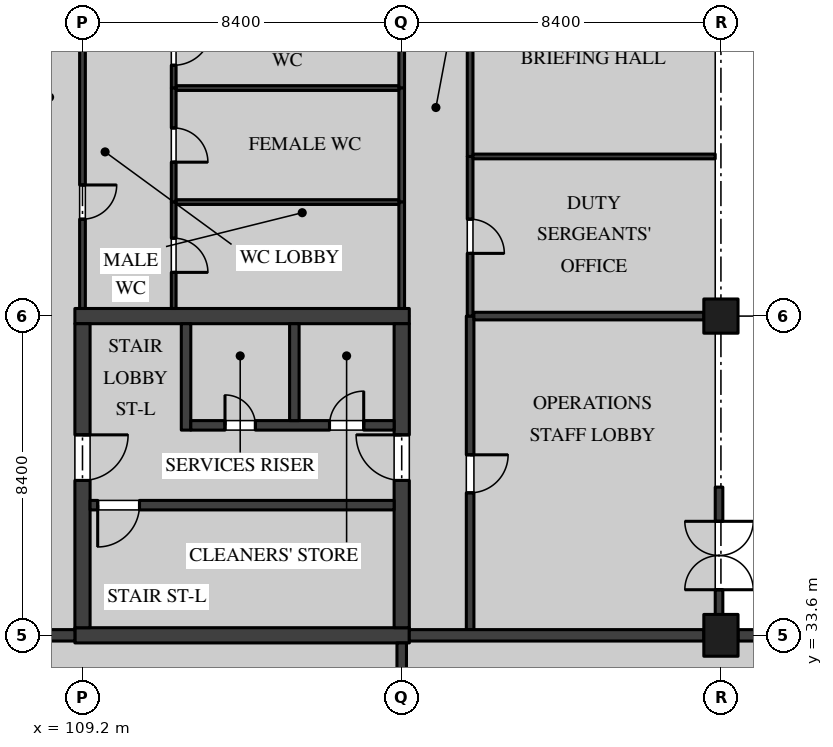
"""IFC4 building model, lengths in metres.
Left out: names, types, materials, properties, quantities, classifications, styles, units other than length and angle.
Written with IfcOpenShell. Run it as: python <this file> out.ifc"""

import sys

from ifc_helpers import new_model, si_unit, direction, frame, frame_2d, origin, origin_2d, place, context, subcontext, project, spatial, rectangle, extrude, element, fill, save


model = new_model("IFC4")
c1 = context("Model", 3, precision=1e-05, world=origin(), true_north=direction((0.0, 1.0)))
c2 = subcontext(c1, "Body", "Model", "MODEL_VIEW")
j1 = project(units=[si_unit("LENGTHUNIT", "METRE"), si_unit("PLANEANGLEUNIT", "RADIAN")], contexts=[c1])
p1 = place(None, origin())
s1 = spatial("IfcSite", under=j1, at=p1, CompositionType="ELEMENT")
p2 = place(p1, origin())
s2 = spatial("IfcBuilding", under=s1, at=p2, CompositionType="ELEMENT")
p3 = place(p2, origin())
s3 = spatial("IfcBuildingStorey", under=s2, at=p3, CompositionType="ELEMENT", Elevation=0.0)
p4 = place(p3, frame((126.0, 33.6, 0.0), z_axis=(0.0, 0.0, 1.0), x_axis=(1.0, 0.0, 0.0)))
e1 = element("IfcColumn", 1, at=p4, inside=s3, PredefinedType="COLUMN", context=c2, shape_type="SweptSolid", body=[
    extrude(rectangle(XDim=0.9, YDim=1.1, at=origin_2d()), origin(), (0.0, 0.0, 1.0), 5.05),
])
p5 = place(p3, frame((126.0, 42.0, 0.0), z_axis=(0.0, 0.0, 1.0), x_axis=(1.0, 0.0, 0.0)))
e2 = element("IfcColumn", 2, at=p5, inside=s3, PredefinedType="COLUMN", context=c2, shape_type="SweptSolid", body=[
    extrude(rectangle(XDim=0.9, YDim=0.9, at=origin_2d()), origin(), (0.0, 0.0, 1.0), 5.05),
])
for number, where, z_axis, x_axis in (
    (3, (109.0, 33.6, 0.0), (0.0, 0.0, 1.0), (1.0, 0.0, 0.0)),
    (4, (109.0, 42.0, 0.0), (0.0, 0.0, 1.0), (1.0, 0.0, 0.0)),
):
    element("IfcWall", number, at=place(p3, frame(where, z_axis=z_axis, x_axis=x_axis)), inside=s3, PredefinedType="SHEAR", context=c2, shape_type="SweptSolid", body=[
        extrude(rectangle(XDim=8.8, YDim=0.4, at=frame_2d((4.4, 0.0))), origin(), (0.0, 0.0, 1.0), 5.05),
    ])
p6 = place(p3, frame((109.2, 33.8, 0.0), z_axis=(0.0, 0.0, 1.0), x_axis=(0.0, 1.0, 0.0)))
e5 = element("IfcWall", 5, at=p6, inside=s3, PredefinedType="SHEAR", context=c2, shape_type="SweptSolid", body=[
    extrude(rectangle(XDim=8.0, YDim=0.4, at=frame_2d((4.0, 0.0))), origin(), (0.0, 0.0, 1.0), 5.05),
])
p7 = place(p6, frame((3.875, 0.0, 0.0)))
e6 = element("IfcOpeningElement", 6, at=p7, cuts=e5, PredefinedType="OPENING", context=c2, shape_type="SweptSolid", body=[
    extrude(rectangle(XDim=1.2, YDim=2.1, at=frame_2d((0.6, 1.05))), frame((0.0, 0.21, 0.0), z_axis=(0.0, -1.0, 0.0), x_axis=(1.0, 0.0, 0.0)), (0.0, 0.0, 1.0), 0.42),
])
p8 = place(p3, frame((117.6, 33.8, 0.0), z_axis=(0.0, 0.0, 1.0), x_axis=(0.0, 1.0, 0.0)))
e7 = element("IfcWall", 7, at=p8, inside=s3, PredefinedType="SHEAR", context=c2, shape_type="SweptSolid", body=[
    extrude(rectangle(XDim=8.0, YDim=0.4, at=frame_2d((4.0, 0.0))), origin(), (0.0, 0.0, 1.0), 5.05),
])
p9 = place(p8, frame((3.875, 0.0, 0.0)))
e8 = element("IfcOpeningElement", 8, at=p9, cuts=e7, PredefinedType="OPENING", context=c2, shape_type="SweptSolid", body=[
    extrude(rectangle(XDim=1.2, YDim=2.1, at=frame_2d((0.6, 1.05))), frame((0.0, 0.21, 0.0), z_axis=(0.0, -1.0, 0.0), x_axis=(1.0, 0.0, 0.0)), (0.0, 0.0, 1.0), 0.42),
])
p10 = place(p3, frame((109.4, 37.025, 0.0), z_axis=(0.0, 0.0, 1.0), x_axis=(1.0, 0.0, 0.0)))
e9 = element("IfcWall", 9, at=p10, inside=s3, PredefinedType="SOLIDWALL", context=c2, shape_type="SweptSolid", body=[
    extrude(rectangle(XDim=8.0, YDim=0.25, at=frame_2d((4.0, 0.0))), origin(), (0.0, 0.0, 1.0), 5.05),
])
p11 = place(p10, frame((0.2, 0.0, 0.0)))
e10 = element("IfcOpeningElement", 10, at=p11, cuts=e9, PredefinedType="OPENING", context=c2, shape_type="SweptSolid", body=[
    extrude(rectangle(XDim=1.1, YDim=2.1, at=frame_2d((0.55, 1.05))), frame((0.0, 0.135, 0.0), z_axis=(0.0, -1.0, 0.0), x_axis=(1.0, 0.0, 0.0)), (0.0, 0.0, 1.0), 0.27),
])
p12 = place(p3, frame((111.925, 39.0, 0.0), z_axis=(0.0, 0.0, 1.0), x_axis=(0.0, 1.0, 0.0)))
e11 = element("IfcWall", 11, at=p12, inside=s3, PredefinedType="SOLIDWALL", context=c2, shape_type="SweptSolid", body=[
    extrude(rectangle(XDim=2.8, YDim=0.25, at=frame_2d((1.4, 0.0))), origin(), (0.0, 0.0, 1.0), 5.05),
])
p13 = place(p3, frame((112.05, 39.125, 0.0), z_axis=(0.0, 0.0, 1.0), x_axis=(1.0, 0.0, 0.0)))
e12 = element("IfcWall", 12, at=p13, inside=s3, PredefinedType="SOLIDWALL", context=c2, shape_type="SweptSolid", body=[
    extrude(rectangle(XDim=5.35, YDim=0.25, at=frame_2d((2.675, 0.0))), origin(), (0.0, 0.0, 1.0), 5.05),
])
p14 = place(p13, frame((3.65, 0.0, 0.0)))
e13 = element("IfcOpeningElement", 13, at=p14, cuts=e12, PredefinedType="OPENING", context=c2, shape_type="SweptSolid", body=[
    extrude(rectangle(XDim=0.9, YDim=2.1, at=frame_2d((0.45, 1.05))), frame((0.0, 0.135, 0.0), z_axis=(0.0, -1.0, 0.0), x_axis=(1.0, 0.0, 0.0)), (0.0, 0.0, 1.0), 0.27),
])
p15 = place(p13, frame((0.9, 0.0, 0.0)))
e14 = element("IfcOpeningElement", 14, at=p15, cuts=e12, PredefinedType="OPENING", context=c2, shape_type="SweptSolid", body=[
    extrude(rectangle(XDim=0.8, YDim=2.1, at=frame_2d((0.4, 1.05))), frame((0.0, 0.135, 0.0), z_axis=(0.0, -1.0, 0.0), x_axis=(1.0, 0.0, 0.0)), (0.0, 0.0, 1.0), 0.27),
])
p16 = place(p3, frame((114.775, 39.25, 0.0), z_axis=(0.0, 0.0, 1.0), x_axis=(0.0, 1.0, 0.0)))
e15 = element("IfcWall", 15, at=p16, inside=s3, PredefinedType="SOLIDWALL", context=c2, shape_type="SweptSolid", body=[
    extrude(rectangle(XDim=2.55, YDim=0.25, at=frame_2d((1.275, 0.0))), origin(), (0.0, 0.0, 1.0), 5.05),
])
p17 = place(p3, frame((117.6, 25.65, 0.0), z_axis=(0.0, 0.0, 1.0), x_axis=(0.0, 1.0, 0.0)))
e16 = element("IfcWall", 16, at=p17, inside=s3, PredefinedType="PARTITIONING", context=c2, shape_type="SweptSolid", body=[
    extrude(rectangle(XDim=7.75, YDim=0.25, at=frame_2d((3.875, 0.0))), origin(), (0.0, 0.0, 1.0), 8.375),
])
p18 = place(p3, frame((119.4, 33.75, 0.0), z_axis=(0.0, 0.0, 1.0), x_axis=(0.0, 1.0, 0.0)))
e17 = element("IfcWall", 17, at=p18, inside=s3, PredefinedType="PARTITIONING", context=c2, shape_type="SweptSolid", body=[
    extrude(rectangle(XDim=8.25, YDim=0.2, at=frame_2d((4.125, 0.0))), origin(), (0.0, 0.0, 1.0), 5.05),
])
p19 = place(p18, frame((3.6, 0.0, 0.0)))
e18 = element("IfcOpeningElement", 18, at=p19, cuts=e17, PredefinedType="OPENING", context=c2, shape_type="SweptSolid", body=[
    extrude(rectangle(XDim=1.0, YDim=2.4, at=frame_2d((0.5, 1.2))), frame((0.0, 0.11, 0.0), z_axis=(0.0, -1.0, 0.0), x_axis=(1.0, 0.0, 0.0)), (0.0, 0.0, 1.0), 0.22),
])
p20 = place(p3, frame((119.4, 42.0, 0.0), z_axis=(0.0, 0.0, 1.0), x_axis=(0.0, 1.0, 0.0)))
e19 = element("IfcWall", 19, at=p20, inside=s3, PredefinedType="PARTITIONING", context=c2, shape_type="SweptSolid", body=[
    extrude(rectangle(XDim=4.2, YDim=0.15, at=frame_2d((2.1, 0.0))), origin(), (0.0, 0.0, 1.0), 5.05),
])
p21 = place(p20, frame((1.65, 0.0, 0.0)))
e20 = element("IfcOpeningElement", 20, at=p21, cuts=e19, PredefinedType="OPENING", context=c2, shape_type="SweptSolid", body=[
    extrude(rectangle(XDim=0.9, YDim=2.1, at=frame_2d((0.45, 1.05))), frame((0.0, 0.085, 0.0), z_axis=(0.0, -1.0, 0.0), x_axis=(1.0, 0.0, 0.0)), (0.0, 0.0, 1.0), 0.17),
])
p22 = place(p3, frame((119.4, 46.2, 0.0), z_axis=(0.0, 0.0, 1.0), x_axis=(0.0, 1.0, 0.0)))
e21 = element("IfcWall", 21, at=p22, inside=s3, PredefinedType="PARTITIONING", context=c2, shape_type="SweptSolid", body=[
    extrude(rectangle(XDim=12.6, YDim=0.15, at=frame_2d((6.3, 0.0))), origin(), (0.0, 0.0, 1.0), 5.05),
])
p23 = place(p22, frame((5.1, 0.0, 0.0)))
e22 = element("IfcOpeningElement", 22, at=p23, cuts=e21, PredefinedType="OPENING", context=c2, shape_type="SweptSolid", body=[
    extrude(rectangle(XDim=2.4, YDim=2.7, at=frame_2d((1.2, 1.35))), frame((0.0, 0.085, 0.0), z_axis=(0.0, -1.0, 0.0), x_axis=(1.0, 0.0, 0.0)), (0.0, 0.0, 1.0), 0.17),
])
p24 = place(p22, frame((10.05, 0.0, 0.0)))
e23 = element("IfcOpeningElement", 23, at=p24, cuts=e21, PredefinedType="OPENING", context=c2, shape_type="SweptSolid", body=[
    extrude(rectangle(XDim=2.4, YDim=2.7, at=frame_2d((1.2, 1.35))), frame((0.0, 0.085, 0.0), z_axis=(0.0, -1.0, 0.0), x_axis=(1.0, 0.0, 0.0)), (0.0, 0.0, 1.0), 0.17),
])
p25 = place(p3, frame((117.6, 48.0, 0.0), z_axis=(0.0, 0.0, 1.0), x_axis=(0.0, 1.0, 0.0)))
e24 = element("IfcWall", 24, at=p25, inside=s3, PredefinedType="PARTITIONING", context=c2, shape_type="SweptSolid", body=[
    extrude(rectangle(XDim=2.2, YDim=0.15, at=frame_2d((1.1, 0.0))), origin(), (0.0, 0.0, 1.0), 5.05),
])
p26 = place(p3, frame((117.6, 45.0, 0.0), z_axis=(0.0, 0.0, 1.0), x_axis=(0.0, 1.0, 0.0)))
e25 = element("IfcWall", 25, at=p26, inside=s3, PredefinedType="PARTITIONING", context=c2, shape_type="SweptSolid", body=[
    extrude(rectangle(XDim=3.0, YDim=0.15, at=frame_2d((1.5, 0.0))), origin(), (0.0, 0.0, 1.0), 5.05),
])
p27 = place(p3, frame((117.6, 42.2, 0.0), z_axis=(0.0, 0.0, 1.0), x_axis=(0.0, 1.0, 0.0)))
e26 = element("IfcWall", 26, at=p27, inside=s3, PredefinedType="PARTITIONING", context=c2, shape_type="SweptSolid", body=[
    extrude(rectangle(XDim=2.8, YDim=0.15, at=frame_2d((1.4, 0.0))), origin(), (0.0, 0.0, 1.0), 5.05),
])
p28 = place(p3, frame((109.2, 42.2, 0.0), z_axis=(0.0, 0.0, 1.0), x_axis=(0.0, 1.0, 0.0)))
e27 = element("IfcWall", 27, at=p28, inside=s3, PredefinedType="PARTITIONING", context=c2, shape_type="SweptSolid", body=[
    extrude(rectangle(XDim=8.0, YDim=0.15, at=frame_2d((4.0, 0.0))), origin(), (0.0, 0.0, 1.0), 5.05),
])
p29 = place(p28, frame((2.35, 0.0, 0.0)))
e28 = element("IfcOpeningElement", 28, at=p29, cuts=e27, PredefinedType="OPENING", context=c2, shape_type="SweptSolid", body=[
    extrude(rectangle(XDim=0.9, YDim=2.1, at=frame_2d((0.45, 1.05))), frame((0.0, 0.085, 0.0), z_axis=(0.0, -1.0, 0.0), x_axis=(1.0, 0.0, 0.0)), (0.0, 0.0, 1.0), 0.17),
])
p30 = place(p3, frame((119.5, 42.0, 0.0), z_axis=(0.0, 0.0, 1.0), x_axis=(1.0, 0.0, 0.0)))
e29 = element("IfcWall", 29, at=p30, inside=s3, PredefinedType="PARTITIONING", context=c2, shape_type="SweptSolid", body=[
    extrude(rectangle(XDim=6.05, YDim=0.2, at=frame_2d((3.025, 0.0))), origin(), (0.0, 0.0, 1.0), 5.05),
])
p31 = place(p3, frame((119.475, 46.2, 0.0), z_axis=(0.0, 0.0, 1.0), x_axis=(1.0, 0.0, 0.0)))
e30 = element("IfcWall", 30, at=p31, inside=s3, PredefinedType="PARTITIONING", context=c2, shape_type="SweptSolid", body=[
    extrude(rectangle(XDim=6.375, YDim=0.125, at=frame_2d((3.188, 0.0))), origin(), (0.0, 0.0, 1.0), 5.05),
])
p32 = place(p3, frame((111.662, 48.0, 0.0), z_axis=(0.0, 0.0, 1.0), x_axis=(1.0, 0.0, 0.0)))
e31 = element("IfcWall", 31, at=p32, inside=s3, PredefinedType="PARTITIONING", context=c2, shape_type="SweptSolid", body=[
    extrude(rectangle(XDim=5.863, YDim=0.125, at=frame_2d((2.931, 0.0))), origin(), (0.0, 0.0, 1.0), 5.05),
])
p33 = place(p3, frame((111.6, 48.0, 0.0), z_axis=(0.0, 0.0, 1.0), x_axis=(0.0, 1.0, 0.0)))
e32 = element("IfcWall", 32, at=p33, inside=s3, PredefinedType="PARTITIONING", context=c2, shape_type="SweptSolid", body=[
    extrude(rectangle(XDim=2.2, YDim=0.125, at=frame_2d((1.1, 0.0))), origin(), (0.0, 0.0, 1.0), 5.05),
])
p34 = place(p33, frame((0.6, 0.0, 0.0)))
e33 = element("IfcOpeningElement", 33, at=p34, cuts=e32, PredefinedType="OPENING", context=c2, shape_type="SweptSolid", body=[
    extrude(rectangle(XDim=1.0, YDim=2.1, at=frame_2d((0.5, 1.05))), frame((0.0, 0.073, 0.0), z_axis=(0.0, -1.0, 0.0), x_axis=(1.0, 0.0, 0.0)), (0.0, 0.0, 1.0), 0.145),
])
p35 = place(p3, frame((111.6, 45.0, 0.0), z_axis=(0.0, 0.0, 1.0), x_axis=(0.0, 1.0, 0.0)))
e34 = element("IfcWall", 34, at=p35, inside=s3, PredefinedType="PARTITIONING", context=c2, shape_type="SweptSolid", body=[
    extrude(rectangle(XDim=3.0, YDim=0.125, at=frame_2d((1.5, 0.0))), origin(), (0.0, 0.0, 1.0), 5.05),
])
p36 = place(p35, frame((1.05, 0.0, 0.0)))
e35 = element("IfcOpeningElement", 35, at=p36, cuts=e34, PredefinedType="OPENING", context=c2, shape_type="SweptSolid", body=[
    extrude(rectangle(XDim=0.9, YDim=2.1, at=frame_2d((0.45, 1.05))), frame((0.0, 0.073, 0.0), z_axis=(0.0, -1.0, 0.0), x_axis=(1.0, 0.0, 0.0)), (0.0, 0.0, 1.0), 0.145),
])
p37 = place(p3, frame((111.662, 45.0, 0.0), z_axis=(0.0, 0.0, 1.0), x_axis=(1.0, 0.0, 0.0)))
e36 = element("IfcWall", 36, at=p37, inside=s3, PredefinedType="PARTITIONING", context=c2, shape_type="SweptSolid", body=[
    extrude(rectangle(XDim=5.863, YDim=0.125, at=frame_2d((2.931, 0.0))), origin(), (0.0, 0.0, 1.0), 5.05),
])
p38 = place(p3, frame((111.6, 42.2, 0.0), z_axis=(0.0, 0.0, 1.0), x_axis=(0.0, 1.0, 0.0)))
e37 = element("IfcWall", 37, at=p38, inside=s3, PredefinedType="PARTITIONING", context=c2, shape_type="SweptSolid", body=[
    extrude(rectangle(XDim=2.8, YDim=0.125, at=frame_2d((1.4, 0.0))), origin(), (0.0, 0.0, 1.0), 5.05),
])
p39 = place(p38, frame((0.95, 0.0, 0.0)))
e38 = element("IfcOpeningElement", 38, at=p39, cuts=e37, PredefinedType="OPENING", context=c2, shape_type="SweptSolid", body=[
    extrude(rectangle(XDim=0.9, YDim=2.1, at=frame_2d((0.45, 1.05))), frame((0.0, 0.073, 0.0), z_axis=(0.0, -1.0, 0.0), x_axis=(1.0, 0.0, 0.0)), (0.0, 0.0, 1.0), 0.145),
])
p40 = place(p3, frame((126.45, 33.6, 5.05), z_axis=(0.0, 0.0, 1.0), x_axis=(-1.0, 0.0, 0.0)))
e39 = element("IfcWall", 39, at=p40, inside=s3, PredefinedType="SOLIDWALL", context=c2, shape_type="SweptSolid", body=[
    extrude(rectangle(XDim=0.9, YDim=0.3, at=frame_2d((0.45, 0.0))), origin(), (0.0, 0.0, 1.0), 0.35),
])
p41 = place(p3, frame((134.07, 33.6, 0.0), z_axis=(0.0, 0.0, 1.0), x_axis=(-1.0, 0.0, 0.0)))
e40 = element("IfcWall", 40, at=p41, inside=s3, PredefinedType="SOLIDWALL", context=c2, shape_type="SweptSolid", body=[
    extrude(rectangle(XDim=7.62, YDim=0.3, at=frame_2d((3.81, 0.0))), origin(), (0.0, 0.0, 1.0), 5.4),
])
p42 = place(p41, frame((0.57, 0.0, 0.6)))
e41 = element("IfcOpeningElement", 41, at=p42, cuts=e40, PredefinedType="OPENING", context=c2, shape_type="SweptSolid", body=[
    extrude(rectangle(XDim=2.4, YDim=2.1, at=frame_2d((1.2, 1.05))), frame((0.0, 0.16, 0.0), z_axis=(0.0, -1.0, 0.0), x_axis=(1.0, 0.0, 0.0)), (0.0, 0.0, 1.0), 0.32),
])
p43 = place(p3, frame((125.95, 34.13, 0.0), z_axis=(0.0, 0.0, 1.0), x_axis=(0.0, 1.0, 0.0)))
e42 = element("IfcWall", 42, at=p43, inside=s3, PredefinedType="SOLIDWALL", context=c2, shape_type="SweptSolid", body=[
    extrude(rectangle(XDim=3.37, YDim=0.2, at=frame_2d((1.685, 0.0))), origin(), (0.0, 0.0, 1.0), 5.05),
])
p44 = place(p43, frame((0.67, 0.0, 0.0)))
e43 = element("IfcOpeningElement", 43, at=p44, cuts=e42, PredefinedType="OPENING", context=c2, shape_type="SweptSolid", body=[
    extrude(rectangle(XDim=1.8, YDim=2.4, at=frame_2d((0.9, 1.2))), frame((0.0, 0.11, 0.0), z_axis=(0.0, -1.0, 0.0), x_axis=(1.0, 0.0, 0.0)), (0.0, 0.0, 1.0), 0.22),
])
p45 = place(p3, frame((125.55, 33.6, 0.0), z_axis=(0.0, 0.0, 1.0), x_axis=(-1.0, 0.0, 0.0)))
e44 = element("IfcWall", 44, at=p45, inside=s3, PredefinedType="SOLIDWALL", context=c2, shape_type="SweptSolid", body=[
    extrude(rectangle(XDim=7.75, YDim=0.3, at=frame_2d((3.875, 0.0))), origin(), (0.0, 0.0, 1.0), 5.4),
])
p46 = place(p3, frame((109.0, 33.6, 0.0), z_axis=(0.0, 0.0, 1.0), x_axis=(-1.0, 0.0, 0.0)))
e45 = element("IfcWall", 45, at=p46, inside=s3, PredefinedType="SOLIDWALL", context=c2, shape_type="SweptSolid", body=[
    extrude(rectangle(XDim=8.0, YDim=0.3, at=frame_2d((4.0, 0.0))), origin(), (0.0, 0.0, 1.0), 5.05),
])
p47 = place(p14, origin())
e46 = element("IfcDoor", 46, at=p47, inside=s3, OperationType="SINGLE_SWING_LEFT", PredefinedType="DOOR", context=c2, shape_type="SweptSolid", body=[
    extrude(rectangle(XDim=0.9, YDim=2.1, at=frame_2d((0.45, 1.05))), frame((0.0, 0.035, 0.0), z_axis=(0.0, -1.0, 0.0), x_axis=(1.0, 0.0, 0.0)), (0.0, 0.0, 1.0), 0.07),
])
fill(e13, e46)
p48 = place(p7, frame((1.2, 0.0, 0.0), z_axis=(0.0, 0.0, 1.0), x_axis=(-1.0, 0.0, 0.0)))
e47 = element("IfcDoor", 47, at=p48, inside=s3, OperationType="SINGLE_SWING_RIGHT", PredefinedType="DOOR", context=c2, shape_type="SweptSolid", body=[
    extrude(rectangle(XDim=1.2, YDim=2.1, at=frame_2d((0.6, 1.05))), frame((0.0, 0.035, 0.0), z_axis=(0.0, -1.0, 0.0), x_axis=(1.0, 0.0, 0.0)), (0.0, 0.0, 1.0), 0.07),
])
fill(e6, e47)
p49 = place(p9, origin())
e48 = element("IfcDoor", 48, at=p49, inside=s3, OperationType="SINGLE_SWING_LEFT", PredefinedType="DOOR", context=c2, shape_type="SweptSolid", body=[
    extrude(rectangle(XDim=1.2, YDim=2.1, at=frame_2d((0.6, 1.05))), frame((0.0, 0.035, 0.0), z_axis=(0.0, -1.0, 0.0), x_axis=(1.0, 0.0, 0.0)), (0.0, 0.0, 1.0), 0.07),
])
fill(e8, e48)
p50 = place(p15, origin())
e49 = element("IfcDoor", 49, at=p50, inside=s3, OperationType="SINGLE_SWING_RIGHT", PredefinedType="DOOR", context=c2, shape_type="SweptSolid", body=[
    extrude(rectangle(XDim=0.8, YDim=2.1, at=frame_2d((0.4, 1.05))), frame((0.0, 0.035, 0.0), z_axis=(0.0, -1.0, 0.0), x_axis=(1.0, 0.0, 0.0)), (0.0, 0.0, 1.0), 0.07),
])
fill(e14, e49)
p51 = place(p11, frame((1.1, 0.0, 0.0), z_axis=(0.0, 0.0, 1.0), x_axis=(-1.0, 0.0, 0.0)))
e50 = element("IfcDoor", 50, at=p51, inside=s3, OperationType="SINGLE_SWING_LEFT", PredefinedType="DOOR", context=c2, shape_type="SweptSolid", body=[
    extrude(rectangle(XDim=1.1, YDim=2.1, at=frame_2d((0.55, 1.05))), frame((0.0, 0.035, 0.0), z_axis=(0.0, -1.0, 0.0), x_axis=(1.0, 0.0, 0.0)), (0.0, 0.0, 1.0), 0.07),
])
fill(e10, e50)
p52 = place(p19, frame((1.0, 0.0, 0.0), z_axis=(0.0, 0.0, 1.0), x_axis=(-1.0, 0.0, 0.0)))
e51 = element("IfcDoor", 51, at=p52, inside=s3, OperationType="SINGLE_SWING_RIGHT", PredefinedType="DOOR", context=c2, shape_type="SweptSolid", body=[
    extrude(rectangle(XDim=1.0, YDim=2.4, at=frame_2d((0.5, 1.2))), frame((0.0, 0.03, 0.0), z_axis=(0.0, -1.0, 0.0), x_axis=(1.0, 0.0, 0.0)), (0.0, 0.0, 1.0), 0.06),
])
fill(e18, e51)
p53 = place(p21, frame((0.9, 0.0, 0.0), z_axis=(0.0, 0.0, 1.0), x_axis=(-1.0, 0.0, 0.0)))
e52 = element("IfcDoor", 52, at=p53, inside=s3, OperationType="SINGLE_SWING_LEFT", PredefinedType="DOOR", context=c2, shape_type="SweptSolid", body=[
    extrude(rectangle(XDim=0.9, YDim=2.1, at=frame_2d((0.45, 1.05))), frame((0.0, 0.025, 0.0), z_axis=(0.0, -1.0, 0.0), x_axis=(1.0, 0.0, 0.0)), (0.0, 0.0, 1.0), 0.05),
])
fill(e20, e52)
p54 = place(p34, frame((1.0, 0.0, 0.0), z_axis=(0.0, 0.0, 1.0), x_axis=(-1.0, 0.0, 0.0)))
e53 = element("IfcDoor", 53, at=p54, inside=s3, OperationType="SINGLE_SWING_RIGHT", PredefinedType="DOOR", context=c2, shape_type="SweptSolid", body=[
    extrude(rectangle(XDim=1.0, YDim=2.1, at=frame_2d((0.5, 1.05))), frame((0.0, 0.02, 0.0), z_axis=(0.0, -1.0, 0.0), x_axis=(1.0, 0.0, 0.0)), (0.0, 0.0, 1.0), 0.04),
])
fill(e33, e53)
p55 = place(p36, frame((0.9, 0.0, 0.0), z_axis=(0.0, 0.0, 1.0), x_axis=(-1.0, 0.0, 0.0)))
e54 = element("IfcDoor", 54, at=p55, inside=s3, OperationType="SINGLE_SWING_LEFT", PredefinedType="DOOR", context=c2, shape_type="SweptSolid", body=[
    extrude(rectangle(XDim=0.9, YDim=2.1, at=frame_2d((0.45, 1.05))), frame((0.0, 0.02, 0.0), z_axis=(0.0, -1.0, 0.0), x_axis=(1.0, 0.0, 0.0)), (0.0, 0.0, 1.0), 0.04),
])
fill(e35, e54)
p56 = place(p29, frame((0.9, 0.0, 0.0), z_axis=(0.0, 0.0, 1.0), x_axis=(-1.0, 0.0, 0.0)))
e55 = element("IfcDoor", 55, at=p56, inside=s3, OperationType="SINGLE_SWING_RIGHT", PredefinedType="DOOR", context=c2, shape_type="SweptSolid", body=[
    extrude(rectangle(XDim=0.9, YDim=2.1, at=frame_2d((0.45, 1.05))), frame((0.0, 0.025, 0.0), z_axis=(0.0, -1.0, 0.0), x_axis=(1.0, 0.0, 0.0)), (0.0, 0.0, 1.0), 0.05),
])
fill(e28, e55)
p57 = place(p39, frame((0.9, 0.0, 0.0), z_axis=(0.0, 0.0, 1.0), x_axis=(-1.0, 0.0, 0.0)))
e56 = element("IfcDoor", 56, at=p57, inside=s3, OperationType="SINGLE_SWING_LEFT", PredefinedType="DOOR", context=c2, shape_type="SweptSolid", body=[
    extrude(rectangle(XDim=0.9, YDim=2.1, at=frame_2d((0.45, 1.05))), frame((0.0, 0.02, 0.0), z_axis=(0.0, -1.0, 0.0), x_axis=(1.0, 0.0, 0.0)), (0.0, 0.0, 1.0), 0.04),
])
fill(e38, e56)
p58 = place(p44, frame((1.8, 0.0, 0.0), z_axis=(0.0, 0.0, 1.0), x_axis=(-1.0, 0.0, 0.0)))
e57 = element("IfcDoor", 57, at=p58, inside=s3, OperationType="DOUBLE_DOOR_DOUBLE_SWING", PredefinedType="DOOR", context=c2, shape_type="SweptSolid", body=[
    extrude(rectangle(XDim=1.8, YDim=2.4, at=frame_2d((0.9, 1.2))), frame((0.0, 0.025, 0.0), z_axis=(0.0, -1.0, 0.0), x_axis=(1.0, 0.0, 0.0)), (0.0, 0.0, 1.0), 0.05),
])
fill(e43, e57)
save(model, sys.argv[1])
